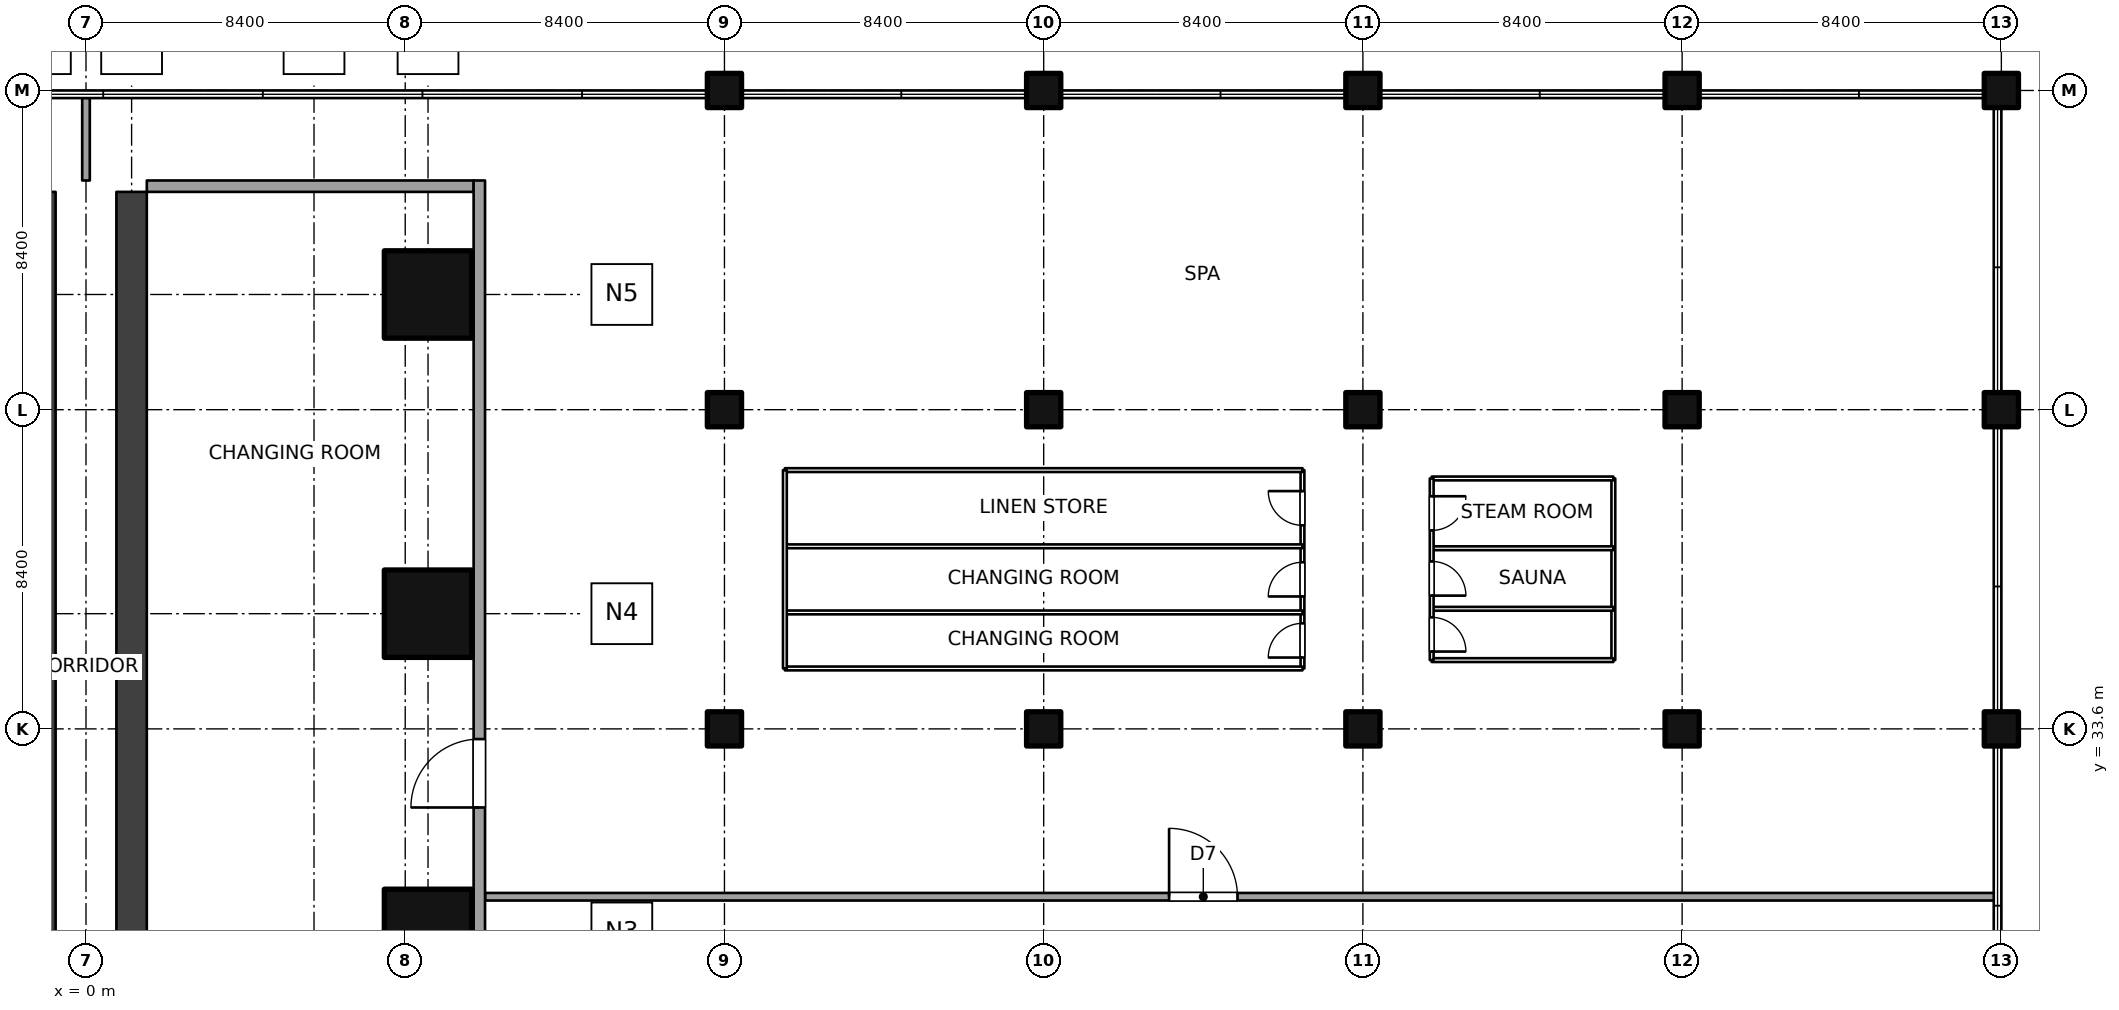
"""IFC4 building model, lengths in metres.
Left out: names, types, materials, properties, quantities, classifications, styles, units other than length and angle.
Written with IfcOpenShell. Run it as: python <this file> out.ifc"""

import sys

from ifc_helpers import new_model, si_unit, direction, frame, frame_2d, origin, origin_2d, place, context, subcontext, project, spatial, rectangle, extrude, element, fill, save


model = new_model("IFC4")
c1 = context("Model", 3, precision=1e-05, world=origin(), true_north=direction((0.0, 1.0)))
c2 = subcontext(c1, "Body", "Model", "MODEL_VIEW")
j1 = project(units=[si_unit("LENGTHUNIT", "METRE"), si_unit("PLANEANGLEUNIT", "RADIAN")], contexts=[c1])
p1 = place(None, origin())
s1 = spatial("IfcSite", under=j1, at=p1, CompositionType="ELEMENT")
p2 = place(p1, origin())
s2 = spatial("IfcBuilding", under=s1, at=p2, CompositionType="ELEMENT")
p3 = place(p2, frame((0.0, 0.0, 11.0)))
s3 = spatial("IfcBuildingStorey", under=s2, at=p3, CompositionType="ELEMENT", Elevation=11.0)
for number, where, z_axis, x_axis in (
    (1, (9.0, 28.231, 0.0), (0.0, 0.0, 1.0), (1.0, 0.0, 0.0)),
    (2, (9.0, 36.632, 0.0), (0.0, 0.0, 1.0), (1.0, 0.0, 0.0)),
    (3, (9.0, 45.031, 0.0), (0.0, 0.0, 1.0), (1.0, 0.0, 0.0)),
):
    element("IfcColumn", number, at=place(p3, frame(where, z_axis=z_axis, x_axis=x_axis)), inside=s3, PredefinedType="COLUMN", context=c2, shape_type="SweptSolid", body=[
        extrude(rectangle(XDim=2.3, YDim=2.3, at=origin_2d()), origin(), (0.0, 0.0, 1.0), 5.0),
    ])
for number, where, z_axis, x_axis in (
    (4, (16.8, 33.6, 0.0), (0.0, 0.0, 1.0), (1.0, 0.0, 0.0)),
    (5, (16.8, 42.0, 0.0), (0.0, 0.0, 1.0), (1.0, 0.0, 0.0)),
    (6, (16.8, 50.4, 0.0), (0.0, 0.0, 1.0), (1.0, 0.0, 0.0)),
    (7, (25.2, 33.6, 0.0), (0.0, 0.0, 1.0), (1.0, 0.0, 0.0)),
    (8, (25.2, 42.0, 0.0), (0.0, 0.0, 1.0), (1.0, 0.0, 0.0)),
    (9, (25.2, 50.4, 0.0), (0.0, 0.0, 1.0), (1.0, 0.0, 0.0)),
    (10, (33.6, 33.6, 0.0), (0.0, 0.0, 1.0), (1.0, 0.0, 0.0)),
    (11, (33.6, 42.0, 0.0), (0.0, 0.0, 1.0), (1.0, 0.0, 0.0)),
    (12, (33.6, 50.4, 0.0), (0.0, 0.0, 1.0), (1.0, 0.0, 0.0)),
    (13, (42.0, 33.6, 0.0), (0.0, 0.0, 1.0), (1.0, 0.0, 0.0)),
    (14, (42.0, 42.0, 0.0), (0.0, 0.0, 1.0), (1.0, 0.0, 0.0)),
    (15, (42.0, 50.4, 0.0), (0.0, 0.0, 1.0), (1.0, 0.0, 0.0)),
    (16, (50.4, 33.6, 0.0), (0.0, 0.0, 1.0), (1.0, 0.0, 0.0)),
    (17, (50.4, 42.0, 0.0), (0.0, 0.0, 1.0), (1.0, 0.0, 0.0)),
    (18, (50.4, 50.4, 0.0), (0.0, 0.0, 1.0), (1.0, 0.0, 0.0)),
):
    element("IfcColumn", number, at=place(p3, frame(where, z_axis=z_axis, x_axis=x_axis)), inside=s3, PredefinedType="COLUMN", context=c2, shape_type="SweptSolid", body=[
        extrude(rectangle(XDim=0.9, YDim=0.9, at=origin_2d()), origin(), (0.0, 0.0, 1.0), 5.0),
    ])
p4 = place(p3, frame((-1.2, 10.981, 0.0), z_axis=(0.0, 0.0, 1.0), x_axis=(0.0, 1.0, 0.0)))
e19 = element("IfcWall", 19, at=p4, inside=s3, PredefinedType="SHEAR", context=c2, shape_type="SweptSolid", body=[
    extrude(rectangle(XDim=36.75, YDim=0.8, at=frame_2d((18.375, 0.0))), origin(), (0.0, 0.0, 1.0), 5.0),
])
p5 = place(p4, frame((2.85, 0.0, 0.0)))
e20 = element("IfcOpeningElement", 20, at=p5, cuts=e19, PredefinedType="OPENING", context=c2, shape_type="SweptSolid", body=[
    extrude(rectangle(XDim=1.2, YDim=2.1, at=frame_2d((0.6, 1.05))), frame((0.0, 0.41, 0.0), z_axis=(0.0, -1.0, 0.0), x_axis=(1.0, 0.0, 0.0)), (0.0, 0.0, 1.0), 0.82),
])
p6 = place(p3, frame((1.2, 10.981, 0.0), z_axis=(0.0, 0.0, 1.0), x_axis=(0.0, 1.0, 0.0)))
e21 = element("IfcWall", 21, at=p6, inside=s3, PredefinedType="SHEAR", context=c2, shape_type="SweptSolid", body=[
    extrude(rectangle(XDim=36.75, YDim=0.8, at=frame_2d((18.375, 0.0))), origin(), (0.0, 0.0, 1.0), 5.0),
])
p7 = place(p6, frame((10.0, 0.0, 0.0)))
e22 = element("IfcOpeningElement", 22, at=p7, cuts=e21, PredefinedType="OPENING", context=c2, shape_type="SweptSolid", body=[
    extrude(rectangle(XDim=1.0, YDim=2.1, at=frame_2d((0.5, 1.05))), frame((0.0, 0.41, 0.0), z_axis=(0.0, -1.0, 0.0), x_axis=(1.0, 0.0, 0.0)), (0.0, 0.0, 1.0), 0.82),
])
p8 = place(p6, frame((2.85, 0.0, 0.0)))
e23 = element("IfcOpeningElement", 23, at=p8, cuts=e21, PredefinedType="OPENING", context=c2, shape_type="SweptSolid", body=[
    extrude(rectangle(XDim=1.2, YDim=2.1, at=frame_2d((0.6, 1.05))), frame((0.0, 0.41, 0.0), z_axis=(0.0, -1.0, 0.0), x_axis=(1.0, 0.0, 0.0)), (0.0, 0.0, 1.0), 0.82),
])
p9 = place(p3, frame((0.0, 48.031, 0.0), z_axis=(0.0, 0.0, 1.0), x_axis=(0.0, 1.0, 0.0)))
e24 = element("IfcWall", 24, at=p9, inside=s3, PredefinedType="SOLIDWALL", context=c2, shape_type="SweptSolid", body=[
    extrude(rectangle(XDim=2.176, YDim=0.2, at=frame_2d((1.088, 0.0))), origin(), (0.0, 0.0, 1.0), 4.7),
])
p10 = place(p3, frame((10.5, 29.183, 0.0), z_axis=(0.0, 0.0, 1.0), x_axis=(1.0, 0.0, 0.0)))
e25 = element("IfcWall", 25, at=p10, inside=s3, PredefinedType="SOLIDWALL", context=c2, shape_type="SweptSolid", body=[
    extrude(rectangle(XDim=39.737, YDim=0.2, at=frame_2d((19.869, 0.0))), origin(), (0.0, 0.0, 1.0), 4.7),
])
p11 = place(p10, frame((18.0, 0.0, 0.0)))
e26 = element("IfcOpeningElement", 26, at=p11, cuts=e25, PredefinedType="OPENING", context=c2, shape_type="SweptSolid", body=[
    extrude(rectangle(XDim=1.8, YDim=2.4, at=frame_2d((0.9, 1.2))), frame((0.0, 0.11, 0.0), z_axis=(0.0, -1.0, 0.0), x_axis=(1.0, 0.0, 0.0)), (0.0, 0.0, 1.0), 0.22),
])
p12 = place(p3, frame((18.39, 35.19, 0.0), z_axis=(0.0, 0.0, 1.0), x_axis=(1.0, 0.0, 0.0)))
e27 = element("IfcWall", 27, at=p12, inside=s3, PredefinedType="PARTITIONING", context=c2, shape_type="SweptSolid", body=[
    extrude(rectangle(XDim=13.62, YDim=0.1, at=frame_2d((6.81, 0.0))), origin(), (0.0, 0.0, 1.0), 4.7),
])
p13 = place(p3, frame((32.01, 35.19, 0.0), z_axis=(0.0, 0.0, 1.0), x_axis=(0.0, 1.0, 0.0)))
e28 = element("IfcWall", 28, at=p13, inside=s3, PredefinedType="PARTITIONING", context=c2, shape_type="SweptSolid", body=[
    extrude(rectangle(XDim=5.22, YDim=0.1, at=frame_2d((2.61, 0.0))), origin(), (0.0, 0.0, 1.0), 4.7),
])
p14 = place(p13, frame((0.287, 0.0, 0.0)))
e29 = element("IfcOpeningElement", 29, at=p14, cuts=e28, PredefinedType="OPENING", context=c2, shape_type="SweptSolid", body=[
    extrude(rectangle(XDim=0.9, YDim=2.1, at=frame_2d((0.45, 1.05))), frame((0.0, 0.06, 0.0), z_axis=(0.0, -1.0, 0.0), x_axis=(1.0, 0.0, 0.0)), (0.0, 0.0, 1.0), 0.12),
])
p15 = place(p13, frame((1.895, 0.0, 0.0)))
e30 = element("IfcOpeningElement", 30, at=p15, cuts=e28, PredefinedType="OPENING", context=c2, shape_type="SweptSolid", body=[
    extrude(rectangle(XDim=0.9, YDim=2.1, at=frame_2d((0.45, 1.05))), frame((0.0, 0.06, 0.0), z_axis=(0.0, -1.0, 0.0), x_axis=(1.0, 0.0, 0.0)), (0.0, 0.0, 1.0), 0.12),
])
p16 = place(p13, frame((3.767, 0.0, 0.0)))
e31 = element("IfcOpeningElement", 31, at=p16, cuts=e28, PredefinedType="OPENING", context=c2, shape_type="SweptSolid", body=[
    extrude(rectangle(XDim=0.9, YDim=2.1, at=frame_2d((0.45, 1.05))), frame((0.0, 0.06, 0.0), z_axis=(0.0, -1.0, 0.0), x_axis=(1.0, 0.0, 0.0)), (0.0, 0.0, 1.0), 0.12),
])
p17 = place(p3, frame((32.01, 40.41, 0.0), z_axis=(0.0, 0.0, 1.0), x_axis=(-1.0, 0.0, 0.0)))
e32 = element("IfcWall", 32, at=p17, inside=s3, PredefinedType="PARTITIONING", context=c2, shape_type="SweptSolid", body=[
    extrude(rectangle(XDim=13.62, YDim=0.1, at=frame_2d((6.81, 0.0))), origin(), (0.0, 0.0, 1.0), 4.7),
])
p18 = place(p3, frame((18.39, 40.41, 0.0), z_axis=(0.0, 0.0, 1.0), x_axis=(0.0, -1.0, 0.0)))
e33 = element("IfcWall", 33, at=p18, inside=s3, PredefinedType="PARTITIONING", context=c2, shape_type="SweptSolid", body=[
    extrude(rectangle(XDim=5.22, YDim=0.1, at=frame_2d((2.61, 0.0))), origin(), (0.0, 0.0, 1.0), 4.7),
])
for number, where, z_axis, x_axis in (
    (34, (18.39, 36.665, 0.0), (0.0, 0.0, 1.0), (1.0, 0.0, 0.0)),
    (35, (18.39, 38.405, 0.0), (0.0, 0.0, 1.0), (1.0, 0.0, 0.0)),
):
    element("IfcWall", number, at=place(p3, frame(where, z_axis=z_axis, x_axis=x_axis)), inside=s3, PredefinedType="PARTITIONING", context=c2, shape_type="SweptSolid", body=[
        extrude(rectangle(XDim=13.62, YDim=0.1, at=frame_2d((6.81, 0.0))), origin(), (0.0, 0.0, 1.0), 4.7),
    ])
for number, where, z_axis, x_axis in (
    (36, (35.41, 35.41, 0.0), (0.0, 0.0, 1.0), (1.0, 0.0, 0.0)),
    (37, (40.19, 35.41, 0.0), (0.0, 0.0, 1.0), (0.0, 1.0, 0.0)),
    (38, (40.19, 40.19, 0.0), (0.0, 0.0, 1.0), (-1.0, 0.0, 0.0)),
):
    element("IfcWall", number, at=place(p3, frame(where, z_axis=z_axis, x_axis=x_axis)), inside=s3, PredefinedType="PARTITIONING", context=c2, shape_type="SweptSolid", body=[
        extrude(rectangle(XDim=4.78, YDim=0.1, at=frame_2d((2.39, 0.0))), origin(), (0.0, 0.0, 1.0), 4.7),
    ])
p19 = place(p3, frame((35.41, 40.19, 0.0), z_axis=(0.0, 0.0, 1.0), x_axis=(0.0, -1.0, 0.0)))
e39 = element("IfcWall", 39, at=p19, inside=s3, PredefinedType="PARTITIONING", context=c2, shape_type="SweptSolid", body=[
    extrude(rectangle(XDim=4.78, YDim=0.1, at=frame_2d((2.39, 0.0))), origin(), (0.0, 0.0, 1.0), 4.7),
])
p20 = place(p19, frame((3.655, 0.0, 0.0)))
e40 = element("IfcOpeningElement", 40, at=p20, cuts=e39, PredefinedType="OPENING", context=c2, shape_type="SweptSolid", body=[
    extrude(rectangle(XDim=0.9, YDim=2.1, at=frame_2d((0.45, 1.05))), frame((0.0, 0.06, 0.0), z_axis=(0.0, -1.0, 0.0), x_axis=(1.0, 0.0, 0.0)), (0.0, 0.0, 1.0), 0.12),
])
p21 = place(p19, frame((2.183, 0.0, 0.0)))
e41 = element("IfcOpeningElement", 41, at=p21, cuts=e39, PredefinedType="OPENING", context=c2, shape_type="SweptSolid", body=[
    extrude(rectangle(XDim=0.9, YDim=2.1, at=frame_2d((0.45, 1.05))), frame((0.0, 0.06, 0.0), z_axis=(0.0, -1.0, 0.0), x_axis=(1.0, 0.0, 0.0)), (0.0, 0.0, 1.0), 0.12),
])
p22 = place(p19, frame((0.468, 0.0, 0.0)))
e42 = element("IfcOpeningElement", 42, at=p22, cuts=e39, PredefinedType="OPENING", context=c2, shape_type="SweptSolid", body=[
    extrude(rectangle(XDim=0.9, YDim=2.1, at=frame_2d((0.45, 1.05))), frame((0.0, 0.06, 0.0), z_axis=(0.0, -1.0, 0.0), x_axis=(1.0, 0.0, 0.0)), (0.0, 0.0, 1.0), 0.12),
])
for number, where, z_axis, x_axis in (
    (43, (35.41, 36.76, 0.0), (0.0, 0.0, 1.0), (1.0, 0.0, 0.0)),
    (44, (35.41, 38.354, 0.0), (0.0, 0.0, 1.0), (1.0, 0.0, 0.0)),
):
    element("IfcWall", number, at=place(p3, frame(where, z_axis=z_axis, x_axis=x_axis)), inside=s3, PredefinedType="PARTITIONING", context=c2, shape_type="SweptSolid", body=[
        extrude(rectangle(XDim=4.78, YDim=0.1, at=frame_2d((2.39, 0.0))), origin(), (0.0, 0.0, 1.0), 4.7),
    ])
p23 = place(p3, frame((1.6, 47.882, 0.0), z_axis=(0.0, 0.0, 1.0), x_axis=(1.0, 0.0, 0.0)))
e45 = element("IfcWall", 45, at=p23, inside=s3, PredefinedType="SOLIDWALL", context=c2, shape_type="SweptSolid", body=[
    extrude(rectangle(XDim=8.6, YDim=0.3, at=frame_2d((4.3, 0.0))), origin(), (0.0, 0.0, 1.0), 3.1),
])
p24 = place(p3, frame((10.35, 6.149, 0.0), z_axis=(0.0, 0.0, 1.0), x_axis=(0.0, 1.0, 0.0)))
e46 = element("IfcWall", 46, at=p24, inside=s3, PredefinedType="SOLIDWALL", context=c2, shape_type="SweptSolid", body=[
    extrude(rectangle(XDim=41.883, YDim=0.3, at=frame_2d((20.941, 0.0))), origin(), (0.0, 0.0, 1.0), 4.7),
])
p25 = place(p24, frame((25.383, 0.0, 0.0)))
e47 = element("IfcOpeningElement", 47, at=p25, cuts=e46, PredefinedType="OPENING", context=c2, shape_type="SweptSolid", body=[
    extrude(rectangle(XDim=1.8, YDim=2.4, at=frame_2d((0.9, 1.2))), frame((0.0, 0.16, 0.0), z_axis=(0.0, -1.0, 0.0), x_axis=(1.0, 0.0, 0.0)), (0.0, 0.0, 1.0), 0.32),
])
p26 = place(p11, origin())
e48 = element("IfcDoor", 48, at=p26, inside=s3, OperationType="DOUBLE_DOOR_DOUBLE_SWING", PredefinedType="DOOR", context=c2, shape_type="SweptSolid", body=[
    extrude(rectangle(XDim=1.8, YDim=2.4, at=frame_2d((0.9, 1.2))), frame((0.0, 0.025, 0.0), z_axis=(0.0, -1.0, 0.0), x_axis=(1.0, 0.0, 0.0)), (0.0, 0.0, 1.0), 0.05),
])
fill(e26, e48)
p27 = place(p14, origin())
e49 = element("IfcDoor", 49, at=p27, inside=s3, OperationType="SINGLE_SWING_LEFT", PredefinedType="DOOR", context=c2, shape_type="SweptSolid", body=[
    extrude(rectangle(XDim=0.9, YDim=2.1, at=frame_2d((0.45, 1.05))), frame((0.0, 0.025, 0.0), z_axis=(0.0, -1.0, 0.0), x_axis=(1.0, 0.0, 0.0)), (0.0, 0.0, 1.0), 0.05),
])
fill(e29, e49)
p28 = place(p15, origin())
e50 = element("IfcDoor", 50, at=p28, inside=s3, OperationType="SINGLE_SWING_LEFT", PredefinedType="DOOR", context=c2, shape_type="SweptSolid", body=[
    extrude(rectangle(XDim=0.9, YDim=2.1, at=frame_2d((0.45, 1.05))), frame((0.0, 0.025, 0.0), z_axis=(0.0, -1.0, 0.0), x_axis=(1.0, 0.0, 0.0)), (0.0, 0.0, 1.0), 0.05),
])
fill(e30, e50)
p29 = place(p16, origin())
e51 = element("IfcDoor", 51, at=p29, inside=s3, OperationType="SINGLE_SWING_RIGHT", PredefinedType="DOOR", context=c2, shape_type="SweptSolid", body=[
    extrude(rectangle(XDim=0.9, YDim=2.1, at=frame_2d((0.45, 1.05))), frame((0.0, 0.025, 0.0), z_axis=(0.0, -1.0, 0.0), x_axis=(1.0, 0.0, 0.0)), (0.0, 0.0, 1.0), 0.05),
])
fill(e31, e51)
p30 = place(p20, origin())
e52 = element("IfcDoor", 52, at=p30, inside=s3, OperationType="SINGLE_SWING_RIGHT", PredefinedType="DOOR", context=c2, shape_type="SweptSolid", body=[
    extrude(rectangle(XDim=0.9, YDim=2.1, at=frame_2d((0.45, 1.05))), frame((0.0, 0.025, 0.0), z_axis=(0.0, -1.0, 0.0), x_axis=(1.0, 0.0, 0.0)), (0.0, 0.0, 1.0), 0.05),
])
fill(e40, e52)
p31 = place(p21, origin())
e53 = element("IfcDoor", 53, at=p31, inside=s3, OperationType="SINGLE_SWING_RIGHT", PredefinedType="DOOR", context=c2, shape_type="SweptSolid", body=[
    extrude(rectangle(XDim=0.9, YDim=2.1, at=frame_2d((0.45, 1.05))), frame((0.0, 0.025, 0.0), z_axis=(0.0, -1.0, 0.0), x_axis=(1.0, 0.0, 0.0)), (0.0, 0.0, 1.0), 0.05),
])
fill(e41, e53)
p32 = place(p22, origin())
e54 = element("IfcDoor", 54, at=p32, inside=s3, OperationType="SINGLE_SWING_LEFT", PredefinedType="DOOR", context=c2, shape_type="SweptSolid", body=[
    extrude(rectangle(XDim=0.9, YDim=2.1, at=frame_2d((0.45, 1.05))), frame((0.0, 0.025, 0.0), z_axis=(0.0, -1.0, 0.0), x_axis=(1.0, 0.0, 0.0)), (0.0, 0.0, 1.0), 0.05),
])
fill(e42, e54)
p33 = place(p25, origin())
e55 = element("IfcDoor", 55, at=p33, inside=s3, OperationType="DOUBLE_DOOR_DOUBLE_SWING", PredefinedType="DOOR", context=c2, shape_type="SweptSolid", body=[
    extrude(rectangle(XDim=1.8, YDim=2.4, at=frame_2d((0.9, 1.2))), frame((0.0, 0.025, 0.0), z_axis=(0.0, -1.0, 0.0), x_axis=(1.0, 0.0, 0.0)), (0.0, 0.0, 1.0), 0.05),
])
fill(e47, e55)
save(model, sys.argv[1])
